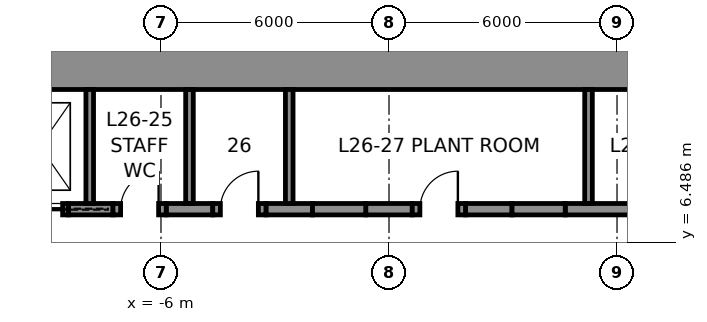
"""IFC4 building model, lengths in metres.
Left out: names, types, materials, properties, quantities, classifications, styles, units other than length and angle.
Written with IfcOpenShell. Run it as: python <this file> out.ifc"""

import sys

from ifc_helpers import new_model, si_unit, direction, frame, frame_2d, origin, place, context, subcontext, project, spatial, rectangle, extrude, element, fill, save


model = new_model("IFC4")
c1 = context("Model", 3, precision=1e-05, world=origin(), true_north=direction((0.0, 1.0)))
c2 = subcontext(c1, "Body", "Model", "MODEL_VIEW")
j1 = project(units=[si_unit("LENGTHUNIT", "METRE"), si_unit("PLANEANGLEUNIT", "RADIAN")], contexts=[c1])
p1 = place(None, origin())
s1 = spatial("IfcSite", under=j1, at=p1, CompositionType="ELEMENT")
p2 = place(p1, origin())
s2 = spatial("IfcBuilding", under=s1, at=p2, CompositionType="ELEMENT")
p3 = place(p2, frame((0.0, 0.0, 131.8)))
s3 = spatial("IfcBuildingStorey", under=s2, at=p3, CompositionType="ELEMENT", Elevation=131.8)
p4 = place(p3, frame((-12.0, 11.25, 0.0), z_axis=(0.0, 0.0, 1.0), x_axis=(1.0, 0.0, 0.0)))
e1 = element("IfcWall", 1, at=p4, inside=s3, PredefinedType="SHEAR", context=c2, shape_type="SweptSolid", body=[
    extrude(rectangle(XDim=24.0, YDim=1.5, at=frame_2d((12.0, 0.0))), origin(), (0.0, 0.0, 1.0), 4.0),
])
p5 = place(p3, frame((-8.438, 7.35, 0.0), z_axis=(0.0, 0.0, 1.0), x_axis=(1.0, 0.0, 0.0)))
e2 = element("IfcWall", 2, at=p5, inside=s3, PredefinedType="SHEAR", context=c2, shape_type="SweptSolid", body=[
    extrude(rectangle(XDim=1.175, YDim=0.3, at=frame_2d((0.587, 0.0))), origin(), (0.0, 0.0, 1.0), 4.0),
])
for number, where, z_axis, x_axis in (
    (3, (-5.863, 7.35, 0.0), (0.0, 0.0, 1.0), (1.0, 0.0, 0.0)),
    (4, (-3.238, 7.35, 0.0), (0.0, 0.0, 1.0), (1.0, 0.0, 0.0)),
    (5, (-0.613, 7.35, 0.0), (0.0, 0.0, 1.0), (1.0, 0.0, 0.0)),
    (6, (2.012, 7.35, 0.0), (0.0, 0.0, 1.0), (1.0, 0.0, 0.0)),
):
    element("IfcWall", number, at=place(p3, frame(where, z_axis=z_axis, x_axis=x_axis)), inside=s3, PredefinedType="SHEAR", context=c2, shape_type="SweptSolid", body=[
        extrude(rectangle(XDim=1.225, YDim=0.3, at=frame_2d((0.613, 0.0))), origin(), (0.0, 0.0, 1.0), 4.0),
    ])
p6 = place(p3, frame((4.637, 7.35, 0.0), z_axis=(0.0, 0.0, 1.0), x_axis=(1.0, 0.0, 0.0)))
e7 = element("IfcWall", 7, at=p6, inside=s3, PredefinedType="SHEAR", context=c2, shape_type="SweptSolid", body=[
    extrude(rectangle(XDim=1.887, YDim=0.3, at=frame_2d((0.944, 0.0))), origin(), (0.0, 0.0, 1.0), 4.0),
])
p7 = place(p3, frame((-9.938, 7.35, 0.0), z_axis=(0.0, 0.0, 1.0), x_axis=(1.0, 0.0, 0.0)))
e8 = element("IfcWall", 8, at=p7, inside=s3, PredefinedType="PARTITIONING", context=c2, shape_type="SweptSolid", body=[
    extrude(rectangle(XDim=1.5, YDim=0.3, at=frame_2d((0.75, 0.0))), origin(), (0.0, 0.0, 1.0), 4.0),
])
p8 = place(p7, frame((0.15, 0.0, 0.0)))
e9 = element("IfcOpeningElement", 9, at=p8, cuts=e8, PredefinedType="OPENING", context=c2, shape_type="SweptSolid", body=[
    extrude(rectangle(XDim=1.2, YDim=2.3, at=frame_2d((0.6, 1.15))), frame((0.0, 0.16, 0.0), z_axis=(0.0, -1.0, 0.0), x_axis=(1.0, 0.0, 0.0)), (0.0, 0.0, 1.0), 0.32),
])
p9 = place(p3, frame((-7.262, 7.35, 0.0), z_axis=(0.0, 0.0, 1.0), x_axis=(1.0, 0.0, 0.0)))
e10 = element("IfcWall", 10, at=p9, inside=s3, PredefinedType="PARTITIONING", context=c2, shape_type="SweptSolid", body=[
    extrude(rectangle(XDim=1.4, YDim=0.3, at=frame_2d((0.7, 0.0))), origin(), (0.0, 0.0, 1.0), 4.0),
])
p10 = place(p9, frame((0.2, 0.0, 0.0)))
e11 = element("IfcOpeningElement", 11, at=p10, cuts=e10, PredefinedType="OPENING", context=c2, shape_type="SweptSolid", body=[
    extrude(rectangle(XDim=1.0, YDim=2.3, at=frame_2d((0.5, 1.15))), frame((0.0, 0.16, 0.0), z_axis=(0.0, -1.0, 0.0), x_axis=(1.0, 0.0, 0.0)), (0.0, 0.0, 1.0), 0.32),
])
p11 = place(p3, frame((-4.637, 7.35, 0.0), z_axis=(0.0, 0.0, 1.0), x_axis=(1.0, 0.0, 0.0)))
e12 = element("IfcWall", 12, at=p11, inside=s3, PredefinedType="PARTITIONING", context=c2, shape_type="SweptSolid", body=[
    extrude(rectangle(XDim=1.4, YDim=0.3, at=frame_2d((0.7, 0.0))), origin(), (0.0, 0.0, 1.0), 4.0),
])
p12 = place(p11, frame((0.2, 0.0, 0.0)))
e13 = element("IfcOpeningElement", 13, at=p12, cuts=e12, PredefinedType="OPENING", context=c2, shape_type="SweptSolid", body=[
    extrude(rectangle(XDim=1.0, YDim=2.3, at=frame_2d((0.5, 1.15))), frame((0.0, 0.16, 0.0), z_axis=(0.0, -1.0, 0.0), x_axis=(1.0, 0.0, 0.0)), (0.0, 0.0, 1.0), 0.32),
])
p13 = place(p3, frame((-2.012, 7.35, 0.0), z_axis=(0.0, 0.0, 1.0), x_axis=(1.0, 0.0, 0.0)))
e14 = element("IfcWall", 14, at=p13, inside=s3, PredefinedType="PARTITIONING", context=c2, shape_type="SweptSolid", body=[
    extrude(rectangle(XDim=1.4, YDim=0.3, at=frame_2d((0.7, 0.0))), origin(), (0.0, 0.0, 1.0), 4.0),
])
p14 = place(p3, frame((0.613, 7.35, 0.0), z_axis=(0.0, 0.0, 1.0), x_axis=(1.0, 0.0, 0.0)))
e15 = element("IfcWall", 15, at=p14, inside=s3, PredefinedType="PARTITIONING", context=c2, shape_type="SweptSolid", body=[
    extrude(rectangle(XDim=1.4, YDim=0.3, at=frame_2d((0.7, 0.0))), origin(), (0.0, 0.0, 1.0), 4.0),
])
p15 = place(p14, frame((0.2, 0.0, 0.0)))
e16 = element("IfcOpeningElement", 16, at=p15, cuts=e15, PredefinedType="OPENING", context=c2, shape_type="SweptSolid", body=[
    extrude(rectangle(XDim=1.0, YDim=2.3, at=frame_2d((0.5, 1.15))), frame((0.0, 0.16, 0.0), z_axis=(0.0, -1.0, 0.0), x_axis=(1.0, 0.0, 0.0)), (0.0, 0.0, 1.0), 0.32),
])
p16 = place(p3, frame((3.238, 7.35, 0.0), z_axis=(0.0, 0.0, 1.0), x_axis=(1.0, 0.0, 0.0)))
e17 = element("IfcWall", 17, at=p16, inside=s3, PredefinedType="PARTITIONING", context=c2, shape_type="SweptSolid", body=[
    extrude(rectangle(XDim=1.4, YDim=0.3, at=frame_2d((0.7, 0.0))), origin(), (0.0, 0.0, 1.0), 4.0),
])
for number, where, z_axis, x_axis in (
    (18, (-7.875, 7.5, 0.0), (0.0, 0.0, 1.0), (0.0, 1.0, 0.0)),
    (19, (-5.25, 7.5, 0.0), (0.0, 0.0, 1.0), (0.0, 1.0, 0.0)),
    (20, (-2.625, 7.5, 0.0), (0.0, 0.0, 1.0), (0.0, 1.0, 0.0)),
    (21, (5.25, 7.5, 0.0), (0.0, 0.0, 1.0), (0.0, 1.0, 0.0)),
):
    element("IfcWall", number, at=place(p3, frame(where, z_axis=z_axis, x_axis=x_axis)), inside=s3, PredefinedType="PARTITIONING", context=c2, shape_type="SweptSolid", body=[
        extrude(rectangle(XDim=3.0, YDim=0.2, at=frame_2d((1.5, 0.0))), origin(), (0.0, 0.0, 1.0), 4.0),
    ])
p17 = place(p10, origin())
e22 = element("IfcDoor", 22, at=p17, inside=s3, OperationType="SINGLE_SWING_RIGHT", PredefinedType="DOOR", context=c2, shape_type="SweptSolid", body=[
    extrude(rectangle(XDim=1.0, YDim=2.3, at=frame_2d((0.5, 1.15))), frame((0.0, 0.025, 0.0), z_axis=(0.0, -1.0, 0.0), x_axis=(1.0, 0.0, 0.0)), (0.0, 0.0, 1.0), 0.05),
])
fill(e11, e22)
p18 = place(p12, origin())
e23 = element("IfcDoor", 23, at=p18, inside=s3, OperationType="SINGLE_SWING_RIGHT", PredefinedType="DOOR", context=c2, shape_type="SweptSolid", body=[
    extrude(rectangle(XDim=1.0, YDim=2.3, at=frame_2d((0.5, 1.15))), frame((0.0, 0.025, 0.0), z_axis=(0.0, -1.0, 0.0), x_axis=(1.0, 0.0, 0.0)), (0.0, 0.0, 1.0), 0.05),
])
fill(e13, e23)
p19 = place(p15, origin())
e24 = element("IfcDoor", 24, at=p19, inside=s3, OperationType="SINGLE_SWING_RIGHT", PredefinedType="DOOR", context=c2, shape_type="SweptSolid", body=[
    extrude(rectangle(XDim=1.0, YDim=2.3, at=frame_2d((0.5, 1.15))), frame((0.0, 0.025, 0.0), z_axis=(0.0, -1.0, 0.0), x_axis=(1.0, 0.0, 0.0)), (0.0, 0.0, 1.0), 0.05),
])
fill(e16, e24)
p20 = place(p8, frame((1.2, 0.0, 0.0), z_axis=(0.0, 0.0, 1.0), x_axis=(-1.0, 0.0, 0.0)))
e25 = element("IfcDoor", 25, at=p20, inside=s3, OperationType="SLIDING_TO_LEFT", PredefinedType="DOOR", context=c2, shape_type="SweptSolid", body=[
    extrude(rectangle(XDim=1.2, YDim=2.3, at=frame_2d((0.6, 1.15))), frame((0.0, 0.025, 0.0), z_axis=(0.0, -1.0, 0.0), x_axis=(1.0, 0.0, 0.0)), (0.0, 0.0, 1.0), 0.05),
])
fill(e9, e25)
save(model, sys.argv[1])
